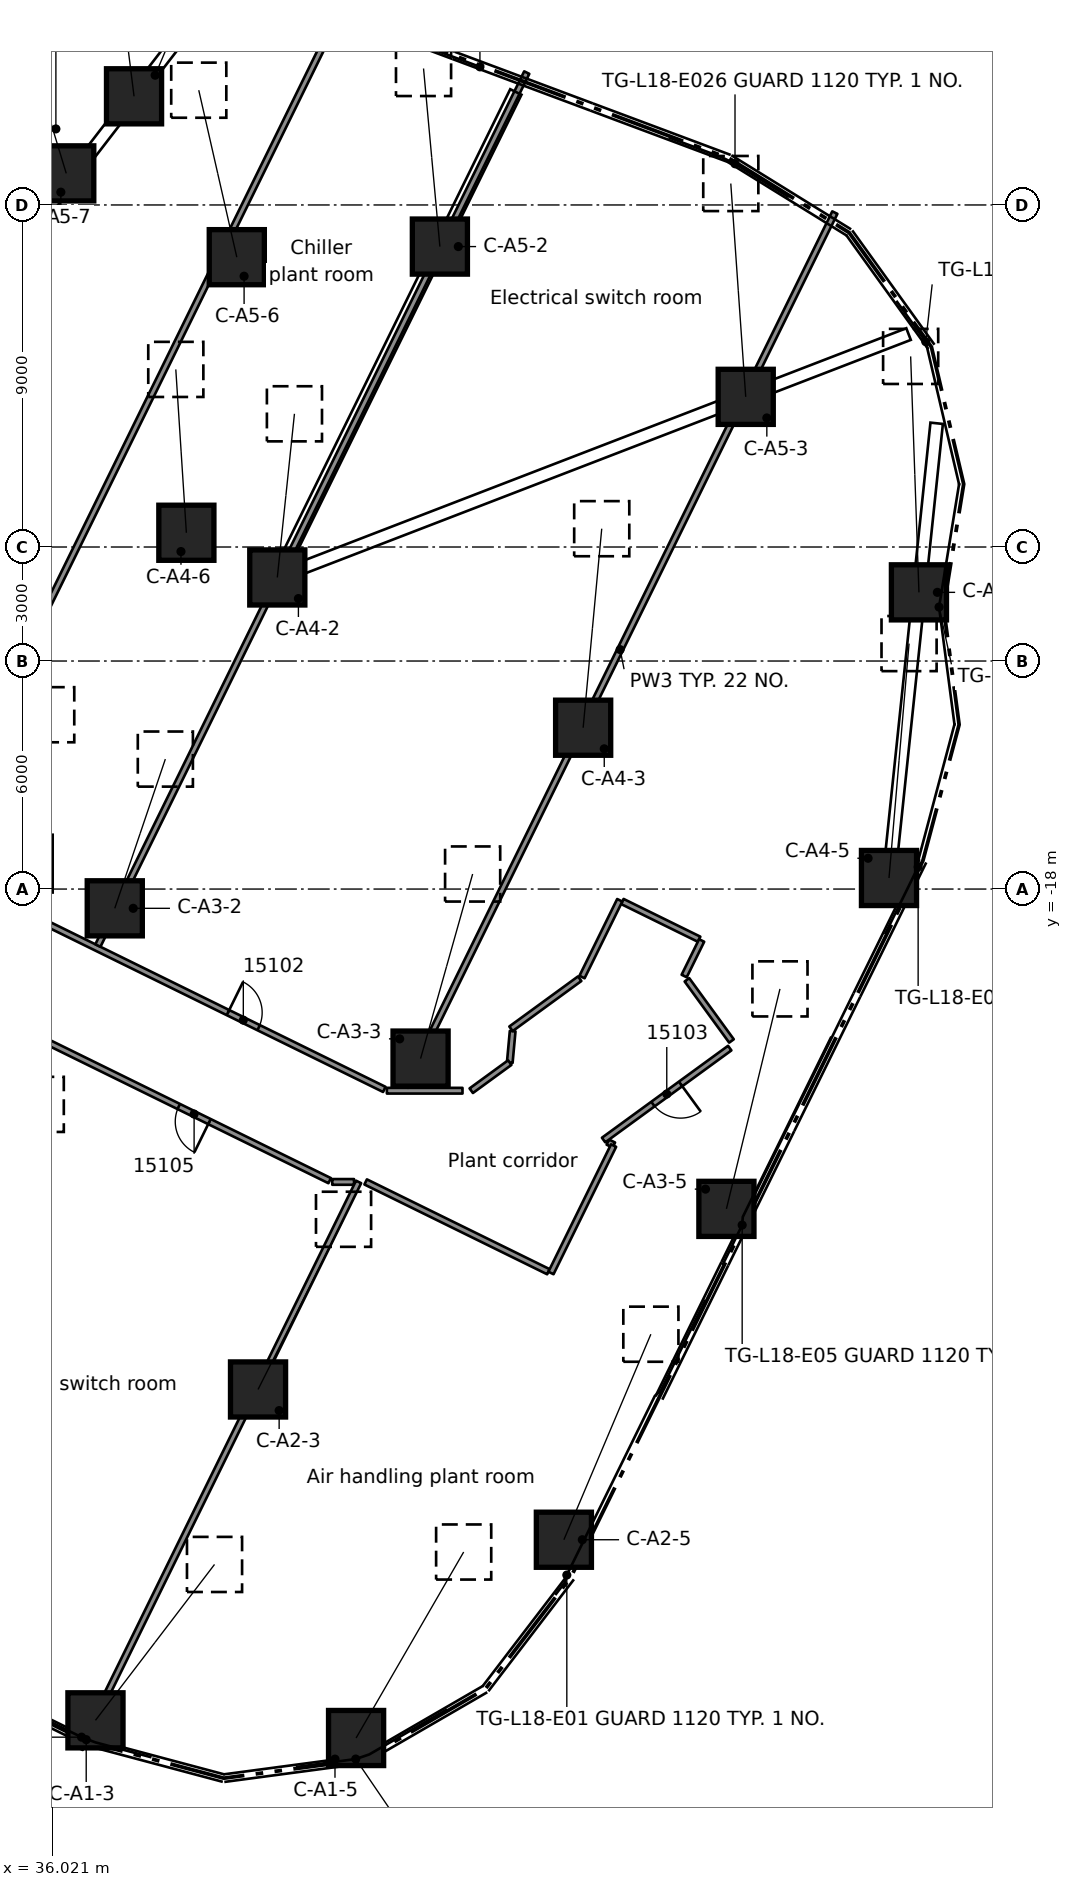
"""IFC4 building model, lengths in metres.
Left out: names, types, materials, properties, quantities, classifications, styles, units other than length and angle.
Written with IfcOpenShell. Run it as: python <this file> out.ifc"""

import sys

from ifc_helpers import new_model, si_unit, direction, frame, frame_2d, origin, origin_2d, place, context, subcontext, project, spatial, rectangle, extrude, element, fill, save


model = new_model("IFC4")
c1 = context("Model", 3, precision=1e-05, world=origin(), true_north=direction((0.0, 1.0)))
c2 = subcontext(c1, "Body", "Model", "MODEL_VIEW")
j1 = project(units=[si_unit("LENGTHUNIT", "METRE"), si_unit("PLANEANGLEUNIT", "RADIAN")], contexts=[c1])
p1 = place(None, origin())
s1 = spatial("IfcSite", under=j1, at=p1, CompositionType="ELEMENT")
p2 = place(p1, origin())
s2 = spatial("IfcBuilding", under=s1, at=p2, CompositionType="ELEMENT")
p3 = place(p2, frame((0.0, 0.0, 76.3)))
s3 = spatial("IfcBuildingStorey", under=s2, at=p3, CompositionType="ELEMENT", Elevation=76.3)
p4 = place(p3, frame((37.158, -39.873, 0.618), z_axis=(0.51751737923, 0.67757554787, 0.522558263856), x_axis=(-0.794713470027, 0.606984761389, 0.0)))
e1 = element("IfcColumn", 1, at=p4, inside=s3, PredefinedType="COLUMN", context=c2, shape_type="SweptSolid", body=[
    extrude(rectangle(XDim=1.45, YDim=1.45, at=origin_2d()), origin(), (0.0, 0.0, 1.0), 6.054),
])
p5 = place(p3, frame((44.016, -40.338, 0.634), z_axis=(0.437998456823, 0.757195262355, 0.484574748091), x_axis=(-0.865613473048, 0.500712807183, 0.0)))
e2 = element("IfcColumn", 2, at=p5, inside=s3, PredefinedType="COLUMN", context=c2, shape_type="SweptSolid", body=[
    extrude(rectangle(XDim=1.45, YDim=1.45, at=origin_2d()), origin(), (0.0, 0.0, 1.0), 6.463),
])
p6 = place(p3, frame((33.388, -27.213, 0.572), z_axis=(0.417502902057, 0.669405381424, 0.614481702001), x_axis=(-0.848496661311, 0.529200732939, 0.0)))
e3 = element("IfcColumn", 3, at=p6, inside=s3, PredefinedType="COLUMN", context=c2, shape_type="SweptSolid", body=[
    extrude(rectangle(XDim=1.45, YDim=1.45, at=origin_2d()), origin(), (0.0, 0.0, 1.0), 5.299),
])
p7 = place(p3, frame((41.436, -31.167, 0.612), z_axis=(0.379249735907, 0.754795861111, 0.5352128977), x_axis=(-0.893548583897, 0.448966511241, 0.0)))
e4 = element("IfcColumn", 4, at=p7, inside=s3, PredefinedType="COLUMN", context=c2, shape_type="SweptSolid", body=[
    extrude(rectangle(XDim=1.45, YDim=1.45, at=origin_2d()), origin(), (0.0, 0.0, 1.0), 5.933),
])
p8 = place(p3, frame((49.484, -35.121, 0.64), z_axis=(0.344227503844, 0.813281534253, 0.469127457777), x_axis=(-0.92090756824, 0.389781029244, 0.0)))
e5 = element("IfcColumn", 5, at=p8, inside=s3, PredefinedType="COLUMN", context=c2, shape_type="SweptSolid", body=[
    extrude(rectangle(XDim=1.45, YDim=1.45, at=origin_2d()), origin(), (0.0, 0.0, 1.0), 6.65),
])
p9 = place(p3, frame((37.666, -18.507, 0.57), z_axis=(0.252347690402, 0.744499743234, 0.618094471318), x_axis=(-0.947075588551, 0.321010637785, 0.0)))
e6 = element("IfcColumn", 6, at=p9, inside=s3, PredefinedType="COLUMN", context=c2, shape_type="SweptSolid", body=[
    extrude(rectangle(XDim=1.45, YDim=1.45, at=origin_2d()), origin(), (0.0, 0.0, 1.0), 5.275),
])
p10 = place(p3, frame((45.713, -22.461, 0.614), z_axis=(0.229855301875, 0.814814927922, 0.532205950207), x_axis=(-0.962438656011, 0.27149923281, 0.0)))
e7 = element("IfcColumn", 7, at=p10, inside=s3, PredefinedType="COLUMN", context=c2, shape_type="SweptSolid", body=[
    extrude(rectangle(XDim=1.45, YDim=1.45, at=origin_2d()), origin(), (0.0, 0.0, 1.0), 5.961),
])
p11 = place(p3, frame((53.761, -26.415, 0.642), z_axis=(0.209585713047, 0.861004693278, 0.463405596686), x_axis=(-0.971628161039, 0.236513671223, 0.0)))
e8 = element("IfcColumn", 8, at=p11, inside=s3, PredefinedType="COLUMN", context=c2, shape_type="SweptSolid", body=[
    extrude(rectangle(XDim=1.45, YDim=1.45, at=origin_2d()), origin(), (0.0, 0.0, 1.0), 6.722),
])
p12 = place(p3, frame((35.272, -17.331, 0.558), z_axis=(0.117156658899, 0.761186259922, 0.637863461081), x_axis=(-0.988361727552, 0.152121975764, 0.0)))
e9 = element("IfcColumn", 9, at=p12, inside=s3, PredefinedType="COLUMN", context=c2, shape_type="SweptSolid", body=[
    extrude(rectangle(XDim=1.45, YDim=1.45, at=origin_2d()), origin(), (0.0, 0.0, 1.0), 5.147),
])
p13 = place(p3, frame((41.943, -9.801, 0.581), z_axis=(0.083399652731, 0.79638314847, 0.599014506299), x_axis=(-0.994561238126, 0.10415346186, 0.0)))
e10 = element("IfcColumn", 10, at=p13, inside=s3, PredefinedType="COLUMN", context=c2, shape_type="SweptSolid", body=[
    extrude(rectangle(XDim=1.45, YDim=1.45, at=origin_2d()), origin(), (0.0, 0.0, 1.0), 5.407),
])
p14 = place(p3, frame((49.991, -13.755, 0.622), z_axis=(0.07971925986, 0.853708499253, 0.514613095354), x_axis=(-0.995668399725, 0.092975468748, 0.0)))
e11 = element("IfcColumn", 11, at=p14, inside=s3, PredefinedType="COLUMN", context=c2, shape_type="SweptSolid", body=[
    extrude(rectangle(XDim=1.45, YDim=1.45, at=origin_2d()), origin(), (0.0, 0.0, 1.0), 6.134),
])
p15 = place(p3, frame((58.039, -17.709, 0.648), z_axis=(0.076219912451, 0.890665988972, 0.44822385148), x_axis=(-0.996358336828, 0.085264674011, 0.0)))
e12 = element("IfcColumn", 12, at=p15, inside=s3, PredefinedType="COLUMN", context=c2, shape_type="SweptSolid", body=[
    extrude(rectangle(XDim=1.45, YDim=1.45, at=origin_2d()), origin(), (0.0, 0.0, 1.0), 6.925),
])
p16 = place(p3, frame((39.55, -8.625, 0.579), z_axis=(-0.051587307713, 0.797361327735, 0.601293325022), x_axis=(-0.997913662281, -0.064562548216, 0.0)))
e13 = element("IfcColumn", 13, at=p16, inside=s3, PredefinedType="COLUMN", context=c2, shape_type="SweptSolid", body=[
    extrude(rectangle(XDim=1.45, YDim=1.45, at=origin_2d()), origin(), (0.0, 0.0, 1.0), 5.39),
])
p17 = place(p3, frame((38.173, 2.859, 0.546), z_axis=(-0.093293000963, 0.747169609484, 0.658053182224), x_axis=(-0.992294736126, -0.123899784732, 0.0)))
e14 = element("IfcColumn", 14, at=p17, inside=s3, PredefinedType="COLUMN", context=c2, shape_type="SweptSolid", body=[
    extrude(rectangle(XDim=1.45, YDim=1.45, at=origin_2d()), origin(), (0.0, 0.0, 1.0), 5.027),
])
p18 = place(p3, frame((46.221, -1.095, 0.599), z_axis=(-0.075541470187, 0.823363417812, 0.562464370863), x_axis=(-0.995817591269, -0.091363695854, 0.0)))
e15 = element("IfcColumn", 15, at=p18, inside=s3, PredefinedType="COLUMN", context=c2, shape_type="SweptSolid", body=[
    extrude(rectangle(XDim=1.45, YDim=1.45, at=origin_2d()), origin(), (0.0, 0.0, 1.0), 5.691),
])
p19 = place(p3, frame((54.269, -5.049, 0.633), z_axis=(-0.06103172714, 0.871540645143, 0.486510053489), x_axis=(-0.997557062645, -0.069856329471, 0.0)))
e16 = element("IfcColumn", 16, at=p19, inside=s3, PredefinedType="COLUMN", context=c2, shape_type="SweptSolid", body=[
    extrude(rectangle(XDim=1.45, YDim=1.45, at=origin_2d()), origin(), (0.0, 0.0, 1.0), 6.44),
])
p20 = place(p3, frame((58.827, -10.193, 0.648), z_axis=(-0.031397668641, 0.894042461591, 0.446880591742), x_axis=(-0.999383905938, -0.03509713025, 0.0)))
e17 = element("IfcColumn", 17, at=p20, inside=s3, PredefinedType="COLUMN", context=c2, shape_type="SweptSolid", body=[
    extrude(rectangle(XDim=1.45, YDim=1.45, at=origin_2d()), origin(), (0.0, 0.0, 1.0), 6.944),
])
p21 = place(p3, frame((40.877, -1.374, 0.59), z_axis=(-0.180717754786, 0.793306866009, 0.581382240396), x_axis=(-0.975020978292, -0.222112790921, 0.0)))
e18 = element("IfcColumn", 18, at=p21, inside=s3, PredefinedType="COLUMN", context=c2, shape_type="SweptSolid", body=[
    extrude(rectangle(XDim=1.45, YDim=1.45, at=origin_2d()), origin(), (0.0, 0.0, 1.0), 5.539),
])
p22 = place(p3, frame((36.389, 0.831, 0.568), z_axis=(-0.227597691455, 0.749892107941, 0.621177202811), x_axis=(-0.956897644935, -0.290425372716, 0.0)))
e19 = element("IfcColumn", 19, at=p22, inside=s3, PredefinedType="COLUMN", context=c2, shape_type="SweptSolid", body=[
    extrude(rectangle(XDim=1.45, YDim=1.45, at=origin_2d()), origin(), (0.0, 0.0, 1.0), 5.254),
])
p23 = place(p3, frame((53.894, -21.997, 0.0), z_axis=(0.0, 0.0, 1.0), x_axis=(-0.588776759567, 0.808295693044, 0.0)))
e20 = element("IfcWall", 20, at=p23, inside=s3, PredefinedType="PARTITIONING", context=c2, shape_type="SweptSolid", body=[
    extrude(rectangle(XDim=1.991, YDim=0.15, at=frame_2d((0.995, 0.0))), origin(), (0.0, 0.0, 1.0), 3.98),
])
p24 = place(p3, frame((48.136, -21.739, 0.0), z_axis=(0.0, 0.0, 1.0), x_axis=(-0.091330059121, -0.995820676779, 0.0)))
e21 = element("IfcWall", 21, at=p24, inside=s3, PredefinedType="PARTITIONING", context=c2, shape_type="SweptSolid", body=[
    extrude(rectangle(XDim=0.831, YDim=0.15, at=frame_2d((0.416, 0.0))), origin(), (0.0, 0.0, 1.0), 3.98),
])
p25 = place(p3, frame((43.321, -25.673, 0.0), z_axis=(0.0, 0.0, 1.0), x_axis=(-0.897519057595, 0.440975669684, 0.0)))
e22 = element("IfcWall", 22, at=p25, inside=s3, PredefinedType="PARTITIONING", context=c2, shape_type="SweptSolid", body=[
    extrude(rectangle(XDim=11.872, YDim=0.15, at=frame_2d((5.936, 0.0))), origin(), (0.0, 0.0, 1.0), 3.98),
])
p26 = place(p25, frame((3.525, 0.0, 0.0)))
e23 = element("IfcOpeningElement", 23, at=p26, cuts=e22, PredefinedType="OPENING", context=c2, shape_type="SweptSolid", body=[
    extrude(rectangle(XDim=0.9, YDim=2.1, at=frame_2d((0.45, 1.05))), frame((0.0, 0.085, 0.0), z_axis=(0.0, -1.0, 0.0), x_axis=(1.0, 0.0, 0.0)), (0.0, 0.0, 1.0), 0.17),
])
p27 = place(p3, frame((44.268, -25.706, 0.0), z_axis=(0.0, 0.0, 1.0), x_axis=(0.897495161726, -0.441024301688, 0.0)))
e24 = element("IfcWall", 24, at=p27, inside=s3, PredefinedType="PARTITIONING", context=c2, shape_type="SweptSolid", body=[
    extrude(rectangle(XDim=5.358, YDim=0.15, at=frame_2d((2.679, 0.0))), origin(), (0.0, 0.0, 1.0), 3.98),
])
p28 = place(p3, frame((27.993, -15.035, 0.0), z_axis=(0.0, 0.0, 1.0), x_axis=(0.897531550108, -0.440950242728, 0.0)))
e25 = element("IfcWall", 25, at=p28, inside=s3, PredefinedType="PARTITIONING", context=c2, shape_type="SweptSolid", body=[
    extrude(rectangle(XDim=18.68, YDim=0.15, at=frame_2d((9.34, 0.0))), origin(), (0.0, 0.0, 1.0), 3.98),
])
p29 = place(p28, frame((2.1, 0.0, 0.0)))
e26 = element("IfcOpeningElement", 26, at=p29, cuts=e25, PredefinedType="OPENING", context=c2, shape_type="SweptSolid", body=[
    extrude(rectangle(XDim=0.9, YDim=2.1, at=frame_2d((0.45, 1.05))), frame((0.0, 0.085, 0.0), z_axis=(0.0, -1.0, 0.0), x_axis=(1.0, 0.0, 0.0)), (0.0, 0.0, 1.0), 0.17),
])
p30 = place(p28, frame((5.723, 0.0, 0.0)))
e27 = element("IfcOpeningElement", 27, at=p30, cuts=e25, PredefinedType="OPENING", context=c2, shape_type="SweptSolid", body=[
    extrude(rectangle(XDim=0.9, YDim=2.1, at=frame_2d((0.45, 1.05))), frame((0.0, 0.085, 0.0), z_axis=(0.0, -1.0, 0.0), x_axis=(1.0, 0.0, 0.0)), (0.0, 0.0, 1.0), 0.17),
])
p31 = place(p28, frame((14.096, 0.0, 0.0)))
e28 = element("IfcOpeningElement", 28, at=p31, cuts=e25, PredefinedType="OPENING", context=c2, shape_type="SweptSolid", body=[
    extrude(rectangle(XDim=0.9, YDim=2.1, at=frame_2d((0.45, 1.05))), frame((0.0, 0.085, 0.0), z_axis=(0.0, -1.0, 0.0), x_axis=(1.0, 0.0, 0.0)), (0.0, 0.0, 1.0), 0.17),
])
p32 = place(p3, frame((51.022, -18.327, 0.0), z_axis=(0.0, 0.0, 1.0), x_axis=(0.897400657945, -0.441216567141, 0.0)))
e29 = element("IfcWall", 29, at=p32, inside=s3, PredefinedType="PARTITIONING", context=c2, shape_type="SweptSolid", body=[
    extrude(rectangle(XDim=2.251, YDim=0.15, at=frame_2d((1.125, 0.0))), origin(), (0.0, 0.0, 1.0), 3.98),
])
p33 = place(p3, frame((50.641, -24.659, 0.0), z_axis=(0.0, 0.0, 1.0), x_axis=(0.897476789299, -0.441061688054, 0.0)))
e30 = element("IfcWall", 30, at=p33, inside=s3, PredefinedType="PARTITIONING", context=c2, shape_type="SweptSolid", body=[
    extrude(rectangle(XDim=0.175, YDim=0.15, at=frame_2d((0.087, 0.0))), origin(), (0.0, 0.0, 1.0), 3.98),
])
p34 = place(p3, frame((43.389, -25.706, 0.0), z_axis=(0.0, 0.0, 1.0), x_axis=(1.0, 0.0, 0.0)))
e31 = element("IfcWall", 31, at=p34, inside=s3, PredefinedType="PARTITIONING", context=c2, shape_type="SweptSolid", body=[
    extrude(rectangle(XDim=0.573, YDim=0.15, at=frame_2d((0.287, 0.0))), origin(), (0.0, 0.0, 1.0), 3.98),
])
p35 = place(p3, frame((44.826, -23.306, 0.0), z_axis=(0.0, 0.0, 1.0), x_axis=(1.0, 0.0, 0.0)))
e32 = element("IfcWall", 32, at=p35, inside=s3, PredefinedType="PARTITIONING", context=c2, shape_type="SweptSolid", body=[
    extrude(rectangle(XDim=1.99, YDim=0.15, at=frame_2d((0.995, 0.0))), origin(), (0.0, 0.0, 1.0), 3.98),
])
p36 = place(p3, frame((53.848, -22.185, 0.0), z_axis=(0.0, 0.0, 1.0), x_axis=(-0.8081289685, -0.589005577453, 0.0)))
e33 = element("IfcWall", 33, at=p36, inside=s3, PredefinedType="PARTITIONING", context=c2, shape_type="SweptSolid", body=[
    extrude(rectangle(XDim=4.107, YDim=0.15, at=frame_2d((2.053, 0.0))), origin(), (0.0, 0.0, 1.0), 3.98),
])
p37 = place(p36, frame((1.6, 0.0, 0.0)))
e34 = element("IfcOpeningElement", 34, at=p37, cuts=e33, PredefinedType="OPENING", context=c2, shape_type="SweptSolid", body=[
    extrude(rectangle(XDim=0.9, YDim=2.1, at=frame_2d((0.45, 1.05))), frame((0.0, 0.085, 0.0), z_axis=(0.0, -1.0, 0.0), x_axis=(1.0, 0.0, 0.0)), (0.0, 0.0, 1.0), 0.17),
])
p38 = place(p3, frame((47.046, -23.306, 0.0), z_axis=(0.0, 0.0, 1.0), x_axis=(0.808188872435, 0.588923379119, 0.0)))
e35 = element("IfcWall", 35, at=p38, inside=s3, PredefinedType="PARTITIONING", context=c2, shape_type="SweptSolid", body=[
    extrude(rectangle(XDim=1.255, YDim=0.15, at=frame_2d((0.627, 0.0))), origin(), (0.0, 0.0, 1.0), 3.98),
])
p39 = place(p3, frame((48.092, -21.677, 0.0), z_axis=(0.0, 0.0, 1.0), x_axis=(0.808032420816, 0.589138020255, 0.0)))
e36 = element("IfcWall", 36, at=p39, inside=s3, PredefinedType="PARTITIONING", context=c2, shape_type="SweptSolid", body=[
    extrude(rectangle(XDim=2.237, YDim=0.15, at=frame_2d((1.119, 0.0))), origin(), (0.0, 0.0, 1.0), 3.98),
])
p40 = place(p3, frame((49.144, -28.102, 0.0), z_axis=(0.0, 0.0, 1.0), x_axis=(0.441190229138, 0.897413606824, 0.0)))
e37 = element("IfcWall", 37, at=p40, inside=s3, PredefinedType="PARTITIONING", context=c2, shape_type="SweptSolid", body=[
    extrude(rectangle(XDim=3.735, YDim=0.15, at=frame_2d((1.868, 0.0))), origin(), (0.0, 0.0, 1.0), 3.98),
])
p41 = place(p3, frame((52.649, -20.288, 0.0), z_axis=(0.0, 0.0, 1.0), x_axis=(0.441393879012, 0.897313458926, 0.0)))
e38 = element("IfcWall", 38, at=p41, inside=s3, PredefinedType="PARTITIONING", context=c2, shape_type="SweptSolid", body=[
    extrude(rectangle(XDim=1.042, YDim=0.15, at=frame_2d((0.521, 0.0))), origin(), (0.0, 0.0, 1.0), 3.98),
])
p42 = place(p3, frame((49.961, -20.315, 0.0), z_axis=(0.0, 0.0, 1.0), x_axis=(0.441216567141, 0.897400657945, 0.0)))
e39 = element("IfcWall", 39, at=p42, inside=s3, PredefinedType="PARTITIONING", context=c2, shape_type="SweptSolid", body=[
    extrude(rectangle(XDim=2.251, YDim=0.15, at=frame_2d((1.125, 0.0))), origin(), (0.0, 0.0, 1.0), 3.98),
])
p43 = place(p3, frame((36.754, -40.62, 0.0), z_axis=(0.0, 0.0, 1.0), x_axis=(0.440996903933, 0.897508624316, 0.0)))
e40 = element("IfcWall", 40, at=p43, inside=s3, PredefinedType="PARTITIONING", context=c2, shape_type="SweptSolid", body=[
    extrude(rectangle(XDim=16.617, YDim=0.15, at=frame_2d((8.309, 0.0))), origin(), (0.0, 0.0, 1.0), 3.98),
])
p44 = place(p3, frame((45.314, -23.198, 0.0), z_axis=(0.0, 0.0, 1.0), x_axis=(0.441005817264, 0.897504244636, 0.0)))
e41 = element("IfcWall", 41, at=p44, inside=s3, PredefinedType="PARTITIONING", context=c2, shape_type="SweptSolid", body=[
    extrude(rectangle(XDim=25.623, YDim=0.15, at=frame_2d((12.812, 0.0))), origin(), (0.0, 0.0, 1.0), 3.98),
])
p45 = place(p3, frame((37.222, -19.486, 0.0), z_axis=(0.0, 0.0, 1.0), x_axis=(0.440971293859, 0.897521207545, 0.0)))
e42 = element("IfcWall", 42, at=p45, inside=s3, PredefinedType="PARTITIONING", context=c2, shape_type="SweptSolid", body=[
    extrude(rectangle(XDim=25.592, YDim=0.15, at=frame_2d((12.796, 0.0))), origin(), (0.0, 0.0, 1.0), 3.98),
])
p46 = place(p3, frame((32.624, -17.227, 0.0), z_axis=(0.0, 0.0, 1.0), x_axis=(0.440938270509, 0.897537431866, 0.0)))
e43 = element("IfcWall", 43, at=p46, inside=s3, PredefinedType="PARTITIONING", context=c2, shape_type="SweptSolid", body=[
    extrude(rectangle(XDim=25.083, YDim=0.15, at=frame_2d((12.542, 0.0))), origin(), (0.0, 0.0, 1.0), 3.98),
])
p47 = place(p31, origin())
e44 = element("IfcDoor", 44, at=p47, inside=s3, OperationType="SINGLE_SWING_RIGHT", PredefinedType="DOOR", context=c2, shape_type="SweptSolid", body=[
    extrude(rectangle(XDim=0.9, YDim=2.1, at=frame_2d((0.45, 1.05))), frame((0.0, 0.025, 0.0), z_axis=(0.0, -1.0, 0.0), x_axis=(1.0, 0.0, 0.0)), (0.0, 0.0, 1.0), 0.05),
])
fill(e28, e44)
p48 = place(p37, origin())
e45 = element("IfcDoor", 45, at=p48, inside=s3, OperationType="SINGLE_SWING_LEFT", PredefinedType="DOOR", context=c2, shape_type="SweptSolid", body=[
    extrude(rectangle(XDim=0.9, YDim=2.1, at=frame_2d((0.45, 1.05))), frame((0.0, 0.025, 0.0), z_axis=(0.0, -1.0, 0.0), x_axis=(1.0, 0.0, 0.0)), (0.0, 0.0, 1.0), 0.05),
])
fill(e34, e45)
p49 = place(p26, origin())
e46 = element("IfcDoor", 46, at=p49, inside=s3, OperationType="SINGLE_SWING_LEFT", PredefinedType="DOOR", context=c2, shape_type="SweptSolid", body=[
    extrude(rectangle(XDim=0.9, YDim=2.1, at=frame_2d((0.45, 1.05))), frame((0.0, 0.025, 0.0), z_axis=(0.0, -1.0, 0.0), x_axis=(1.0, 0.0, 0.0)), (0.0, 0.0, 1.0), 0.05),
])
fill(e23, e46)
save(model, sys.argv[1])
